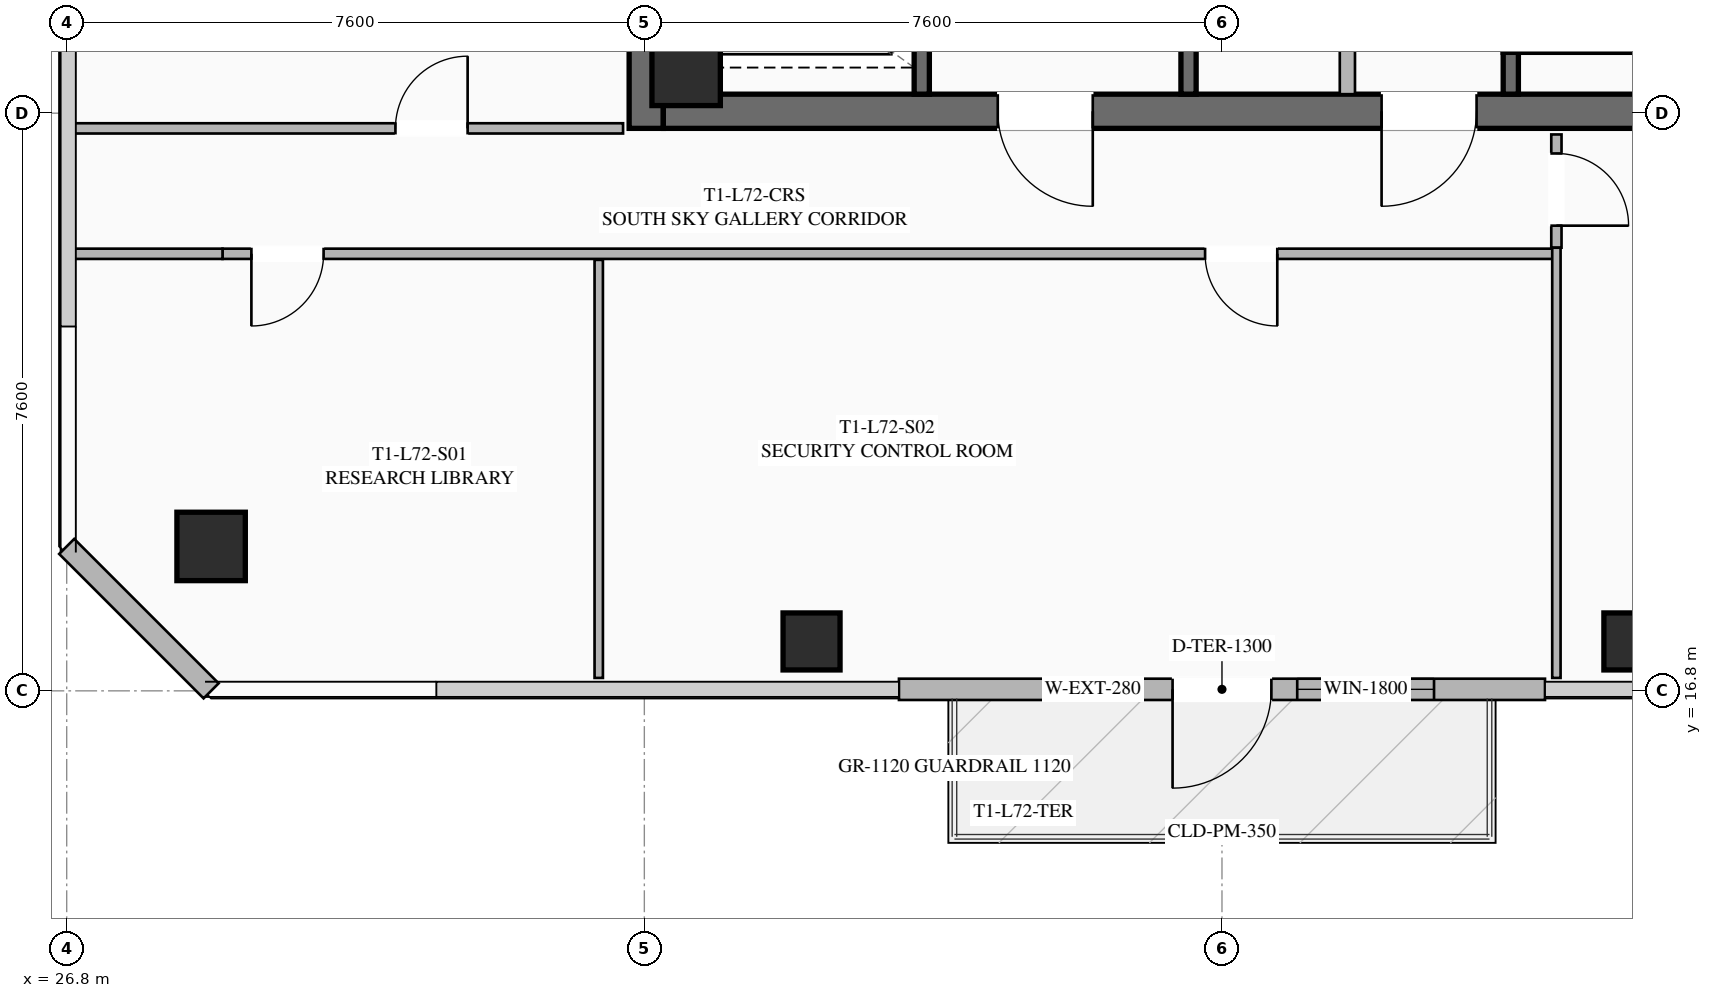
"""IFC4 building model, lengths in metres.
Left out: names, types, materials, properties, quantities, classifications, styles, units other than length and angle.
Written with IfcOpenShell. Run it as: python <this file> out.ifc"""

import sys

from ifc_helpers import new_model, si_unit, direction, frame, frame_2d, origin, origin_2d, place, context, subcontext, project, spatial, rectangle, hollow_rectangle, extrude, element, fill, save


model = new_model("IFC4")
c1 = context("Model", 3, precision=1e-05, world=origin(), true_north=direction((0.0, 1.0)))
c2 = subcontext(c1, "Body", "Model", "MODEL_VIEW")
j1 = project(units=[si_unit("LENGTHUNIT", "METRE"), si_unit("PLANEANGLEUNIT", "RADIAN")], contexts=[c1])
p1 = place(None, origin())
s1 = spatial("IfcSite", under=j1, at=p1, CompositionType="ELEMENT")
p2 = place(p1, origin())
s2 = spatial("IfcBuilding", under=s1, at=p2, CompositionType="ELEMENT")
p3 = place(p2, frame((0.0, 0.0, 266.95)))
s3 = spatial("IfcBuildingStorey", under=s2, at=p3, CompositionType="ELEMENT", Elevation=266.95)
p4 = place(p3, frame((34.425, 24.2, 0.0), z_axis=(0.0, 0.0, 1.0), x_axis=(0.0, 1.0, 0.0)))
e1 = element("IfcWall", 1, at=p4, inside=s3, PredefinedType="SHEAR", context=c2, shape_type="SweptSolid", body=[
    extrude(rectangle(XDim=15.6, YDim=0.45, at=frame_2d((7.8, 0.0))), origin(), (0.0, 0.0, 1.0), 3.55),
])
p5 = place(p3, frame((49.35, 24.425, 0.0), z_axis=(0.0, 0.0, 1.0), x_axis=(-1.0, 0.0, 0.0)))
e2 = element("IfcWall", 2, at=p5, inside=s3, PredefinedType="SHEAR", context=c2, shape_type="SweptSolid", body=[
    extrude(rectangle(XDim=14.7, YDim=0.45, at=frame_2d((7.35, 0.0))), origin(), (0.0, 0.0, 1.0), 3.55),
])
p6 = place(p5, frame((9.05, 0.0, 0.0)))
e3 = element("IfcOpeningElement", 3, at=p6, cuts=e2, PredefinedType="OPENING", context=c2, shape_type="SweptSolid", body=[
    extrude(rectangle(XDim=1.25, YDim=2.25, at=frame_2d((0.625, 1.125))), frame((0.0, 0.235, 0.0), z_axis=(0.0, -1.0, 0.0), x_axis=(1.0, 0.0, 0.0)), (0.0, 0.0, 1.0), 0.47),
])
p7 = place(p5, frame((4.0, 0.0, 0.0)))
e4 = element("IfcOpeningElement", 4, at=p7, cuts=e2, PredefinedType="OPENING", context=c2, shape_type="SweptSolid", body=[
    extrude(rectangle(XDim=1.25, YDim=2.25, at=frame_2d((0.625, 1.125))), frame((0.0, 0.235, 0.0), z_axis=(0.0, -1.0, 0.0), x_axis=(1.0, 0.0, 0.0)), (0.0, 0.0, 1.0), 0.47),
])
for number, where, z_axis, x_axis in (
    (5, (34.95, 24.95, 0.0), (0.0, 0.0, 1.0), (1.0, 0.0, 0.0)),
    (6, (28.7, 18.7, 0.0), (0.0, 0.0, 1.0), (1.0, 0.0, 0.0)),
):
    element("IfcColumn", number, at=place(p3, frame(where, z_axis=z_axis, x_axis=x_axis)), inside=s3, PredefinedType="COLUMN", context=c2, shape_type="SweptSolid", body=[
        extrude(hollow_rectangle(XDim=0.9, YDim=0.9, WallThickness=0.04, at=origin_2d()), origin(), (0.0, 0.0, 1.0), 3.37),
    ])
for number, where, z_axis, x_axis in (
    (7, (36.6, 17.45, 0.0), (0.0, 0.0, 1.0), (1.0, 0.0, 0.0)),
    (8, (47.4, 17.45, 0.0), (0.0, 0.0, 1.0), (1.0, 0.0, 0.0)),
):
    element("IfcColumn", number, at=place(p3, frame(where, z_axis=z_axis, x_axis=x_axis)), inside=s3, PredefinedType="COLUMN", context=c2, shape_type="SweptSolid", body=[
        extrude(hollow_rectangle(XDim=0.75, YDim=0.75, WallThickness=0.032, at=origin_2d()), origin(), (0.0, 0.0, 1.0), 3.37),
    ])
p8 = place(p3, frame((46.25, 16.82, 0.0), z_axis=(0.0, 0.0, 1.0), x_axis=(-1.0, 0.0, 0.0)))
e9 = element("IfcWall", 9, at=p8, inside=s3, PredefinedType="SOLIDWALL", context=c2, shape_type="SweptSolid", body=[
    extrude(rectangle(XDim=8.5, YDim=0.28, at=frame_2d((4.25, 0.0))), origin(), (0.0, 0.0, 1.0), 3.37),
])
p9 = place(p8, frame((3.6, 0.0, 0.0)))
e10 = element("IfcOpeningElement", 10, at=p9, cuts=e9, PredefinedType="OPENING", context=c2, shape_type="SweptSolid", body=[
    extrude(rectangle(XDim=1.3, YDim=2.15, at=frame_2d((0.65, 1.075))), frame((0.0, 0.15, 0.0), z_axis=(0.0, -1.0, 0.0), x_axis=(1.0, 0.0, 0.0)), (0.0, 0.0, 1.0), 0.3),
])
p10 = place(p8, frame((1.46, 0.0, 0.85)))
e11 = element("IfcOpeningElement", 11, at=p10, cuts=e9, PredefinedType="OPENING", context=c2, shape_type="SweptSolid", body=[
    extrude(rectangle(XDim=1.8, YDim=1.92, at=frame_2d((0.9, 0.96))), frame((0.0, 0.15, 0.0), z_axis=(0.0, -1.0, 0.0), x_axis=(1.0, 0.0, 0.0)), (0.0, 0.0, 1.0), 0.3),
])
p11 = place(p3, frame((28.7, 16.8, 0.0), z_axis=(0.0, 0.0, 1.0), x_axis=(-0.707106781187, 0.707106781187, 0.0)))
e12 = element("IfcWall", 12, at=p11, inside=s3, PredefinedType="SOLIDWALL", context=c2, shape_type="SweptSolid", body=[
    extrude(rectangle(XDim=2.687, YDim=0.28, at=frame_2d((1.343, 0.0))), origin(), (0.0, 0.0, 1.0), 3.37),
])
p12 = place(p3, frame((45.8, 32.8, 0.0), z_axis=(0.0, 0.0, 1.0), x_axis=(0.0, -1.0, 0.0)))
e13 = element("IfcWall", 13, at=p12, inside=s3, PredefinedType="SHEAR", context=c2, shape_type="SweptSolid", body=[
    extrude(rectangle(XDim=8.15, YDim=0.2, at=frame_2d((4.075, 0.0))), origin(), (0.0, 0.0, 1.0), 3.37),
])
p13 = place(p12, frame((0.45, 0.0, 0.0)))
e14 = element("IfcOpeningElement", 14, at=p13, cuts=e13, PredefinedType="OPENING", context=c2, shape_type="SweptSolid", body=[
    extrude(rectangle(XDim=1.15, YDim=2.2, at=frame_2d((0.575, 1.1))), frame((0.0, 0.11, 0.0), z_axis=(0.0, -1.0, 0.0), x_axis=(1.0, 0.0, 0.0)), (0.0, 0.0, 1.0), 0.22),
])
p14 = place(p3, frame((41.56, 24.65, 0.0), z_axis=(0.0, 0.0, 1.0), x_axis=(0.0, 1.0, 0.0)))
e15 = element("IfcWall", 15, at=p14, inside=s3, PredefinedType="SHEAR", context=c2, shape_type="SweptSolid", body=[
    extrude(rectangle(XDim=14.7, YDim=0.2, at=frame_2d((7.35, 0.0))), origin(), (0.0, 0.0, 1.0), 3.37),
])
p15 = place(p3, frame((38.05, 24.65, 0.0), z_axis=(0.0, 0.0, 1.0), x_axis=(0.0, 1.0, 0.0)))
e16 = element("IfcWall", 16, at=p15, inside=s3, PredefinedType="SHEAR", context=c2, shape_type="SweptSolid", body=[
    extrude(rectangle(XDim=6.55, YDim=0.2, at=frame_2d((3.275, 0.0))), origin(), (0.0, 0.0, 1.0), 3.37),
])
p16 = place(p15, frame((4.975, 0.0, 0.0)))
e17 = element("IfcOpeningElement", 17, at=p16, cuts=e16, PredefinedType="OPENING", context=c2, shape_type="SweptSolid", body=[
    extrude(rectangle(XDim=1.3, YDim=2.25, at=frame_2d((0.65, 1.125))), frame((0.0, 0.11, 0.0), z_axis=(0.0, -1.0, 0.0), x_axis=(1.0, 0.0, 0.0)), (0.0, 0.0, 1.0), 0.22),
])
p17 = place(p15, frame((2.975, 0.0, 0.0)))
e18 = element("IfcOpeningElement", 18, at=p17, cuts=e16, PredefinedType="OPENING", context=c2, shape_type="SweptSolid", body=[
    extrude(rectangle(XDim=1.3, YDim=2.25, at=frame_2d((0.65, 1.125))), frame((0.0, 0.11, 0.0), z_axis=(0.0, -1.0, 0.0), x_axis=(1.0, 0.0, 0.0)), (0.0, 0.0, 1.0), 0.22),
])
p18 = place(p15, frame((0.775, 0.0, 0.0)))
e19 = element("IfcOpeningElement", 19, at=p18, cuts=e16, PredefinedType="OPENING", context=c2, shape_type="SweptSolid", body=[
    extrude(rectangle(XDim=1.3, YDim=2.25, at=frame_2d((0.65, 1.125))), frame((0.0, 0.11, 0.0), z_axis=(0.0, -1.0, 0.0), x_axis=(1.0, 0.0, 0.0)), (0.0, 0.0, 1.0), 0.22),
])
p19 = place(p3, frame((43.65, 24.65, 0.0), z_axis=(0.0, 0.0, 1.0), x_axis=(0.0, 1.0, 0.0)))
e20 = element("IfcWall", 20, at=p19, inside=s3, PredefinedType="SOLIDWALL", context=c2, shape_type="SweptSolid", body=[
    extrude(rectangle(XDim=7.0, YDim=0.2, at=frame_2d((3.5, 0.0))), origin(), (0.0, 0.0, 1.0), 2.723),
])
p20 = place(p19, frame((0.85, 0.0, 0.0)))
e21 = element("IfcOpeningElement", 21, at=p20, cuts=e20, PredefinedType="OPENING", context=c2, shape_type="SweptSolid", body=[
    extrude(rectangle(XDim=0.95, YDim=2.05, at=frame_2d((0.475, 1.025))), frame((0.0, 0.11, 0.0), z_axis=(0.0, -1.0, 0.0), x_axis=(1.0, 0.0, 0.0)), (0.0, 0.0, 1.0), 0.22),
])
p21 = place(p19, frame((4.8, 0.0, 0.0)))
e22 = element("IfcOpeningElement", 22, at=p21, cuts=e20, PredefinedType="OPENING", context=c2, shape_type="SweptSolid", body=[
    extrude(rectangle(XDim=1.05, YDim=2.2, at=frame_2d((0.525, 1.1))), frame((0.0, 0.11, 0.0), z_axis=(0.0, -1.0, 0.0), x_axis=(1.0, 0.0, 0.0)), (0.0, 0.0, 1.0), 0.22),
])
p22 = place(p3, frame((46.4, 22.55, 0.0), z_axis=(0.0, 0.0, 1.0), x_axis=(-1.0, 0.0, 0.0)))
e23 = element("IfcWall", 23, at=p22, inside=s3, PredefinedType="PARTITIONING", context=c2, shape_type="SweptSolid", body=[
    extrude(rectangle(XDim=17.55, YDim=0.135, at=frame_2d((8.775, 0.0))), origin(), (0.0, 0.0, 1.0), 2.723),
])
p23 = place(p22, frame((16.22, 0.0, 0.0)))
e24 = element("IfcOpeningElement", 24, at=p23, cuts=e23, PredefinedType="OPENING", context=c2, shape_type="SweptSolid", body=[
    extrude(rectangle(XDim=0.95, YDim=2.05, at=frame_2d((0.475, 1.025))), frame((0.0, 0.077, 0.0), z_axis=(0.0, -1.0, 0.0), x_axis=(1.0, 0.0, 0.0)), (0.0, 0.0, 1.0), 0.155),
])
p24 = place(p22, frame((3.672, 0.0, 0.0)))
e25 = element("IfcOpeningElement", 25, at=p24, cuts=e23, PredefinedType="OPENING", context=c2, shape_type="SweptSolid", body=[
    extrude(rectangle(XDim=0.95, YDim=2.05, at=frame_2d((0.475, 1.025))), frame((0.0, 0.077, 0.0), z_axis=(0.0, -1.0, 0.0), x_axis=(1.0, 0.0, 0.0)), (0.0, 0.0, 1.0), 0.155),
])
p25 = place(p3, frame((26.82, 22.55, 0.0), z_axis=(0.0, 0.0, 1.0), x_axis=(1.0, 0.0, 0.0)))
e26 = element("IfcWall", 26, at=p25, inside=s3, PredefinedType="PARTITIONING", context=c2, shape_type="SweptSolid", body=[
    extrude(rectangle(XDim=2.03, YDim=0.135, at=frame_2d((1.015, 0.0))), origin(), (0.0, 0.0, 1.0), 2.723),
])
p26 = place(p3, frame((46.4, 24.12, 0.0), z_axis=(0.0, 0.0, 1.0), x_axis=(0.0, -1.0, 0.0)))
e27 = element("IfcWall", 27, at=p26, inside=s3, PredefinedType="PARTITIONING", context=c2, shape_type="SweptSolid", body=[
    extrude(rectangle(XDim=1.49, YDim=0.135, at=frame_2d((0.745, 0.0))), origin(), (0.0, 0.0, 1.0), 2.723),
])
p27 = place(p26, frame((0.25, 0.0, 0.0)))
e28 = element("IfcOpeningElement", 28, at=p27, cuts=e27, PredefinedType="OPENING", context=c2, shape_type="SweptSolid", body=[
    extrude(rectangle(XDim=0.95, YDim=2.05, at=frame_2d((0.475, 1.025))), frame((0.0, 0.077, 0.0), z_axis=(0.0, -1.0, 0.0), x_axis=(1.0, 0.0, 0.0)), (0.0, 0.0, 1.0), 0.155),
])
p28 = place(p3, frame((33.8, 16.97, 0.0), z_axis=(0.0, 0.0, 1.0), x_axis=(0.0, 1.0, 0.0)))
e29 = element("IfcWall", 29, at=p28, inside=s3, PredefinedType="PARTITIONING", context=c2, shape_type="SweptSolid", body=[
    extrude(rectangle(XDim=5.5, YDim=0.11, at=frame_2d((2.75, 0.0))), origin(), (0.0, 0.0, 1.0), 2.723),
])
p29 = place(p3, frame((46.4, 16.97, 0.0), z_axis=(0.0, 0.0, 1.0), x_axis=(0.0, 1.0, 0.0)))
e30 = element("IfcWall", 30, at=p29, inside=s3, PredefinedType="PARTITIONING", context=c2, shape_type="SweptSolid", body=[
    extrude(rectangle(XDim=5.66, YDim=0.11, at=frame_2d((2.83, 0.0))), origin(), (0.0, 0.0, 1.0), 2.723),
])
p30 = place(p3, frame((26.82, 24.2, 0.0), z_axis=(0.0, 0.0, 1.0), x_axis=(1.0, 0.0, 0.0)))
e31 = element("IfcWall", 31, at=p30, inside=s3, PredefinedType="PARTITIONING", context=c2, shape_type="SweptSolid", body=[
    extrude(rectangle(XDim=7.3, YDim=0.135, at=frame_2d((3.65, 0.0))), origin(), (0.0, 0.0, 1.0), 2.723),
])
p31 = place(p30, frame((4.305, 0.0, 0.0)))
e32 = element("IfcOpeningElement", 32, at=p31, cuts=e31, PredefinedType="OPENING", context=c2, shape_type="SweptSolid", body=[
    extrude(rectangle(XDim=0.95, YDim=2.05, at=frame_2d((0.475, 1.025))), frame((0.0, 0.077, 0.0), z_axis=(0.0, -1.0, 0.0), x_axis=(1.0, 0.0, 0.0)), (0.0, 0.0, 1.0), 0.155),
])
p32 = place(p9, origin())
e33 = element("IfcDoor", 33, at=p32, inside=s3, OperationType="SINGLE_SWING_RIGHT", PredefinedType="DOOR", context=c2, shape_type="SweptSolid", body=[
    extrude(rectangle(XDim=1.3, YDim=2.15, at=frame_2d((0.65, 1.075))), frame((0.0, 0.025, 0.0), z_axis=(0.0, -1.0, 0.0), x_axis=(1.0, 0.0, 0.0)), (0.0, 0.0, 1.0), 0.05),
])
fill(e10, e33)
p33 = place(p10, origin())
e34 = element("IfcWindow", 34, at=p33, inside=s3, PartitioningType="SINGLE_PANEL", PredefinedType="WINDOW", context=c2, shape_type="SweptSolid", body=[
    extrude(rectangle(XDim=1.8, YDim=1.92, at=frame_2d((0.9, 0.96))), frame((0.0, 0.03, 0.0), z_axis=(0.0, -1.0, 0.0), x_axis=(1.0, 0.0, 0.0)), (0.0, 0.0, 1.0), 0.06),
])
fill(e11, e34)
p34 = place(p6, origin())
e35 = element("IfcDoor", 35, at=p34, inside=s3, OperationType="SINGLE_SWING_LEFT", PredefinedType="DOOR", context=c2, shape_type="SweptSolid", body=[
    extrude(rectangle(XDim=1.25, YDim=2.25, at=frame_2d((0.625, 1.125))), frame((0.0, 0.025, 0.0), z_axis=(0.0, -1.0, 0.0), x_axis=(1.0, 0.0, 0.0)), (0.0, 0.0, 1.0), 0.05),
])
fill(e3, e35)
p35 = place(p7, origin())
e36 = element("IfcDoor", 36, at=p35, inside=s3, OperationType="SINGLE_SWING_RIGHT", PredefinedType="DOOR", context=c2, shape_type="SweptSolid", body=[
    extrude(rectangle(XDim=1.25, YDim=2.25, at=frame_2d((0.625, 1.125))), frame((0.0, 0.025, 0.0), z_axis=(0.0, -1.0, 0.0), x_axis=(1.0, 0.0, 0.0)), (0.0, 0.0, 1.0), 0.05),
])
fill(e4, e36)
p36 = place(p23, origin())
e37 = element("IfcDoor", 37, at=p36, inside=s3, OperationType="SINGLE_SWING_RIGHT", PredefinedType="DOOR", context=c2, shape_type="SweptSolid", body=[
    extrude(rectangle(XDim=0.95, YDim=2.05, at=frame_2d((0.475, 1.025))), frame((0.0, 0.025, 0.0), z_axis=(0.0, -1.0, 0.0), x_axis=(1.0, 0.0, 0.0)), (0.0, 0.0, 1.0), 0.05),
])
fill(e24, e37)
p37 = place(p24, origin())
e38 = element("IfcDoor", 38, at=p37, inside=s3, OperationType="SINGLE_SWING_LEFT", PredefinedType="DOOR", context=c2, shape_type="SweptSolid", body=[
    extrude(rectangle(XDim=0.95, YDim=2.05, at=frame_2d((0.475, 1.025))), frame((0.0, 0.025, 0.0), z_axis=(0.0, -1.0, 0.0), x_axis=(1.0, 0.0, 0.0)), (0.0, 0.0, 1.0), 0.05),
])
fill(e25, e38)
p38 = place(p27, origin())
e39 = element("IfcDoor", 39, at=p38, inside=s3, OperationType="SINGLE_SWING_RIGHT", PredefinedType="DOOR", context=c2, shape_type="SweptSolid", body=[
    extrude(rectangle(XDim=0.95, YDim=2.05, at=frame_2d((0.475, 1.025))), frame((0.0, 0.025, 0.0), z_axis=(0.0, -1.0, 0.0), x_axis=(1.0, 0.0, 0.0)), (0.0, 0.0, 1.0), 0.05),
])
fill(e28, e39)
p39 = place(p31, origin())
e40 = element("IfcDoor", 40, at=p39, inside=s3, OperationType="SINGLE_SWING_RIGHT", PredefinedType="DOOR", context=c2, shape_type="SweptSolid", body=[
    extrude(rectangle(XDim=0.95, YDim=2.05, at=frame_2d((0.475, 1.025))), frame((0.0, 0.025, 0.0), z_axis=(0.0, -1.0, 0.0), x_axis=(1.0, 0.0, 0.0)), (0.0, 0.0, 1.0), 0.05),
])
fill(e32, e40)
save(model, sys.argv[1])
